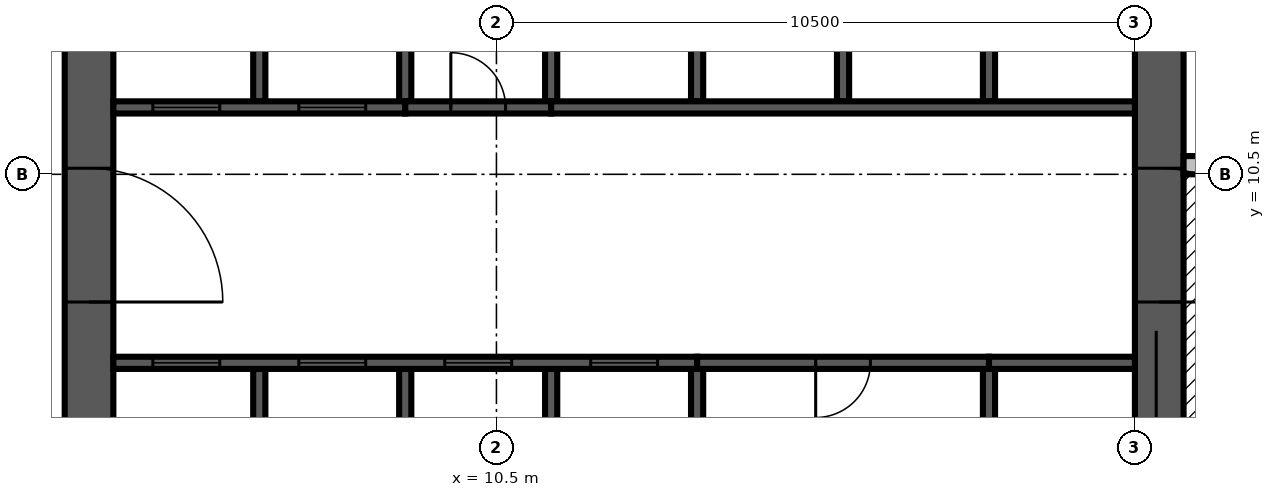
"""IFC4 building model, lengths in metres.
Left out: names, types, materials, properties, quantities, classifications, styles, units other than length and angle.
Written with IfcOpenShell. Run it as: python <this file> out.ifc"""

import sys

from ifc_helpers import new_model, si_unit, direction, frame, frame_2d, origin, place, context, subcontext, project, spatial, rectangle, extrude, source, transform, mapped, element, fill, save


model = new_model("IFC4")
c1 = context("Model", 3, precision=1e-05, world=origin(), true_north=direction((0.0, 1.0)))
c2 = subcontext(c1, "Body", "Model", "MODEL_VIEW")
j1 = project(units=[si_unit("LENGTHUNIT", "METRE"), si_unit("PLANEANGLEUNIT", "RADIAN")], contexts=[c1])
p1 = place(None, origin())
s1 = spatial("IfcSite", under=j1, at=p1, CompositionType="ELEMENT")
p2 = place(p1, origin())
s2 = spatial("IfcBuilding", under=s1, at=p2, CompositionType="ELEMENT")
p3 = place(p2, frame((0.0, 0.0, 253.8)))
s3 = spatial("IfcBuildingStorey", under=s2, at=p3, CompositionType="ELEMENT", Elevation=253.8)
m1 = source(origin(), c2, "Body", "SweptSolid", [
    extrude(rectangle(XDim=17.6, YDim=0.8, at=frame_2d((8.8, 0.0))), origin(), (0.0, 0.0, 1.0), 3.8),
])
p4 = place(p3, frame((3.8, 4.2, 0.0), z_axis=(0.0, 0.0, 1.0), x_axis=(0.0, 1.0, 0.0)))
e1 = element("IfcWall", 1, at=p4, inside=s3, PredefinedType="SHEAR", context=c2, shape_type="MappedRepresentation", body=[
    mapped(m1, transform((0.0, 0.0, 0.0), scale=1.0)),
])
m2 = source(origin(), c2, "Body", "SweptSolid", [
    extrude(rectangle(XDim=2.2, YDim=2.1, at=frame_2d((1.1, 1.05))), frame((0.0, 0.41, 0.0), z_axis=(0.0, -1.0, 0.0), x_axis=(1.0, 0.0, 0.0)), (0.0, 0.0, 1.0), 0.82),
])
p5 = place(p4, frame((4.2, 0.0, 0.0)))
e2 = element("IfcOpeningElement", 2, at=p5, cuts=e1, PredefinedType="OPENING", context=c2, shape_type="MappedRepresentation", body=[
    mapped(m2, transform((0.0, 0.0, 0.0), scale=1.0)),
])
m3 = source(origin(), c2, "Body", "SweptSolid", [
    extrude(rectangle(XDim=0.9, YDim=2.1, at=frame_2d((0.45, 1.05))), frame((0.0, 0.41, 0.0), z_axis=(0.0, -1.0, 0.0), x_axis=(1.0, 0.0, 0.0)), (0.0, 0.0, 1.0), 0.82),
])
p6 = place(p4, frame((10.95, 0.0, 0.0)))
e3 = element("IfcOpeningElement", 3, at=p6, cuts=e1, PredefinedType="OPENING", context=c2, shape_type="MappedRepresentation", body=[
    mapped(m3, transform((0.0, 0.0, 0.0), scale=1.0)),
])
m4 = source(origin(), c2, "Body", "SweptSolid", [
    extrude(rectangle(XDim=16.8, YDim=0.8, at=frame_2d((8.4, 0.0))), origin(), (0.0, 0.0, 1.0), 3.8),
])
p7 = place(p3, frame((21.4, 4.2, 0.0), z_axis=(0.0, 0.0, 1.0), x_axis=(0.0, 1.0, 0.0)))
e4 = element("IfcWall", 4, at=p7, inside=s3, PredefinedType="SHEAR", context=c2, shape_type="MappedRepresentation", body=[
    mapped(m4, transform((0.0, 0.0, 0.0), scale=1.0)),
])
p8 = place(p7, frame((4.2, 0.0, 0.0)))
e5 = element("IfcOpeningElement", 5, at=p8, cuts=e4, PredefinedType="OPENING", context=c2, shape_type="MappedRepresentation", body=[
    mapped(m2, transform((0.0, 0.0, 0.0), scale=1.0)),
])
m5 = source(origin(), c2, "Body", "SweptSolid", [
    extrude(rectangle(XDim=1.2, YDim=2.1, at=frame_2d((0.6, 1.05))), frame((0.0, 0.41, 0.0), z_axis=(0.0, -1.0, 0.0), x_axis=(1.0, 0.0, 0.0)), (0.0, 0.0, 1.0), 0.82),
])
p9 = place(p7, frame((14.7, 0.0, 0.0)))
e6 = element("IfcOpeningElement", 6, at=p9, cuts=e4, PredefinedType="OPENING", context=c2, shape_type="MappedRepresentation", body=[
    mapped(m5, transform((0.0, 0.0, 0.0), scale=1.0)),
])
m6 = source(origin(), c2, "Body", "SweptSolid", [
    extrude(rectangle(XDim=7.2, YDim=0.3, at=frame_2d((3.6, 0.0))), origin(), (0.0, 0.0, 1.0), 3.4),
])
p10 = place(p3, frame((21.8, 10.65, 0.0), z_axis=(0.0, 0.0, 1.0), x_axis=(1.0, 0.0, 0.0)))
e7 = element("IfcWall", 7, at=p10, inside=s3, PredefinedType="STANDARD", context=c2, shape_type="MappedRepresentation", body=[
    mapped(m6, transform((0.0, 0.0, 0.0), scale=1.0)),
])
m7 = source(origin(), c2, "Body", "SweptSolid", [
    extrude(rectangle(XDim=1.8, YDim=2.4, at=frame_2d((0.9, 1.2))), frame((0.0, 0.16, 0.0), z_axis=(0.0, -1.0, 0.0), x_axis=(1.0, 0.0, 0.0)), (0.0, 0.0, 1.0), 0.32),
])
p11 = place(p10, frame((0.4, 0.0, 0.0)))
e8 = element("IfcOpeningElement", 8, at=p11, cuts=e7, PredefinedType="OPENING", context=c2, shape_type="MappedRepresentation", body=[
    mapped(m7, transform((0.0, 0.0, 0.0), scale=1.0)),
])
p12 = place(p10, frame((4.6, 0.0, 0.0)))
e9 = element("IfcOpeningElement", 9, at=p12, cuts=e7, PredefinedType="OPENING", context=c2, shape_type="MappedRepresentation", body=[
    mapped(m7, transform((0.0, 0.0, 0.0), scale=1.0)),
])
m8 = source(origin(), c2, "Body", "SweptSolid", [
    extrude(rectangle(XDim=3.1, YDim=0.2, at=frame_2d((1.55, 0.0))), origin(), (0.0, 0.0, 1.0), 3.8),
])
for number, where, z_axis, x_axis in (
    (10, (6.6, 4.2, 0.0), (0.0, 0.0, 1.0), (0.0, 1.0, 0.0)),
    (11, (9.0, 4.2, 0.0), (0.0, 0.0, 1.0), (0.0, 1.0, 0.0)),
    (12, (11.4, 4.2, 0.0), (0.0, 0.0, 1.0), (0.0, 1.0, 0.0)),
):
    element("IfcWall", number, at=place(p3, frame(where, z_axis=z_axis, x_axis=x_axis)), inside=s3, PredefinedType="SOLIDWALL", context=c2, shape_type="MappedRepresentation", body=[
        mapped(m8, transform((0.0, 0.0, 0.0), scale=1.0)),
    ])
m9 = source(origin(), c2, "Body", "SweptSolid", [
    extrude(rectangle(XDim=3.1, YDim=0.2, at=frame_2d((1.55, 0.0))), origin(), (0.0, 0.0, 1.0), 3.4),
])
for number, where, z_axis, x_axis in (
    (13, (13.8, 4.2, 0.0), (0.0, 0.0, 1.0), (0.0, 1.0, 0.0)),
    (14, (18.6, 4.2, 0.0), (0.0, 0.0, 1.0), (0.0, 1.0, 0.0)),
):
    element("IfcWall", number, at=place(p3, frame(where, z_axis=z_axis, x_axis=x_axis)), inside=s3, PredefinedType="SOLIDWALL", context=c2, shape_type="MappedRepresentation", body=[
        mapped(m9, transform((0.0, 0.0, 0.0), scale=1.0)),
    ])
m10 = source(origin(), c2, "Body", "SweptSolid", [
    extrude(rectangle(XDim=3.0, YDim=0.2, at=frame_2d((1.5, 0.0))), origin(), (0.0, 0.0, 1.0), 3.8),
])
p13 = place(p3, frame((6.6, 11.7, 0.0), z_axis=(0.0, 0.0, 1.0), x_axis=(0.0, 1.0, 0.0)))
e15 = element("IfcWall", 15, at=p13, inside=s3, PredefinedType="SOLIDWALL", context=c2, shape_type="MappedRepresentation", body=[
    mapped(m10, transform((0.0, 0.0, 0.0), scale=1.0)),
])
m11 = source(origin(), c2, "Body", "SweptSolid", [
    extrude(rectangle(XDim=3.0, YDim=0.2, at=frame_2d((1.5, 0.0))), origin(), (0.0, 0.0, 1.0), 3.4),
])
for number, where, z_axis, x_axis in (
    (16, (9.0, 11.7, 0.0), (0.0, 0.0, 1.0), (0.0, 1.0, 0.0)),
    (17, (11.4, 11.7, 0.0), (0.0, 0.0, 1.0), (0.0, 1.0, 0.0)),
):
    element("IfcWall", number, at=place(p3, frame(where, z_axis=z_axis, x_axis=x_axis)), inside=s3, PredefinedType="SOLIDWALL", context=c2, shape_type="MappedRepresentation", body=[
        mapped(m11, transform((0.0, 0.0, 0.0), scale=1.0)),
    ])
for number, where, z_axis, x_axis in (
    (18, (13.8, 11.7, 0.0), (0.0, 0.0, 1.0), (0.0, 1.0, 0.0)),
    (19, (16.2, 11.7, 0.0), (0.0, 0.0, 1.0), (0.0, 1.0, 0.0)),
    (20, (18.6, 11.7, 0.0), (0.0, 0.0, 1.0), (0.0, 1.0, 0.0)),
):
    element("IfcWall", number, at=place(p3, frame(where, z_axis=z_axis, x_axis=x_axis)), inside=s3, PredefinedType="SOLIDWALL", context=c2, shape_type="MappedRepresentation", body=[
        mapped(m10, transform((0.0, 0.0, 0.0), scale=1.0)),
    ])
m12 = source(origin(), c2, "Body", "SweptSolid", [
    extrude(rectangle(XDim=9.6, YDim=0.2, at=frame_2d((4.8, 0.0))), origin(), (0.0, 0.0, 1.0), 3.8),
])
p14 = place(p3, frame((4.2, 7.4, 0.0), z_axis=(0.0, 0.0, 1.0), x_axis=(1.0, 0.0, 0.0)))
e21 = element("IfcWall", 21, at=p14, inside=s3, PredefinedType="SOLIDWALL", context=c2, shape_type="MappedRepresentation", body=[
    mapped(m12, transform((0.0, 0.0, 0.0), scale=1.0)),
])
m13 = source(origin(), c2, "Body", "SweptSolid", [
    extrude(rectangle(XDim=1.1, YDim=2.1, at=frame_2d((0.55, 1.05))), frame((0.0, 0.11, 0.0), z_axis=(0.0, -1.0, 0.0), x_axis=(1.0, 0.0, 0.0)), (0.0, 0.0, 1.0), 0.22),
])
p15 = place(p14, frame((0.65, 0.0, 0.0)))
e22 = element("IfcOpeningElement", 22, at=p15, cuts=e21, PredefinedType="OPENING", context=c2, shape_type="MappedRepresentation", body=[
    mapped(m13, transform((0.0, 0.0, 0.0), scale=1.0)),
])
p16 = place(p14, frame((3.05, 0.0, 0.0)))
e23 = element("IfcOpeningElement", 23, at=p16, cuts=e21, PredefinedType="OPENING", context=c2, shape_type="MappedRepresentation", body=[
    mapped(m13, transform((0.0, 0.0, 0.0), scale=1.0)),
])
p17 = place(p14, frame((5.45, 0.0, 0.0)))
e24 = element("IfcOpeningElement", 24, at=p17, cuts=e21, PredefinedType="OPENING", context=c2, shape_type="MappedRepresentation", body=[
    mapped(m13, transform((0.0, 0.0, 0.0), scale=1.0)),
])
p18 = place(p14, frame((7.85, 0.0, 0.0)))
e25 = element("IfcOpeningElement", 25, at=p18, cuts=e21, PredefinedType="OPENING", context=c2, shape_type="MappedRepresentation", body=[
    mapped(m13, transform((0.0, 0.0, 0.0), scale=1.0)),
])
m14 = source(origin(), c2, "Body", "SweptSolid", [
    extrude(rectangle(XDim=4.8, YDim=0.2, at=frame_2d((2.4, 0.0))), origin(), (0.0, 0.0, 1.0), 3.4),
])
p19 = place(p3, frame((13.8, 7.4, 0.0), z_axis=(0.0, 0.0, 1.0), x_axis=(1.0, 0.0, 0.0)))
e26 = element("IfcWall", 26, at=p19, inside=s3, PredefinedType="SOLIDWALL", context=c2, shape_type="MappedRepresentation", body=[
    mapped(m14, transform((0.0, 0.0, 0.0), scale=1.0)),
])
m15 = source(origin(), c2, "Body", "SweptSolid", [
    extrude(rectangle(XDim=0.9, YDim=2.1, at=frame_2d((0.45, 1.05))), frame((0.0, 0.11, 0.0), z_axis=(0.0, -1.0, 0.0), x_axis=(1.0, 0.0, 0.0)), (0.0, 0.0, 1.0), 0.22),
])
p20 = place(p19, frame((1.95, 0.0, 0.0)))
e27 = element("IfcOpeningElement", 27, at=p20, cuts=e26, PredefinedType="OPENING", context=c2, shape_type="MappedRepresentation", body=[
    mapped(m15, transform((0.0, 0.0, 0.0), scale=1.0)),
])
m16 = source(origin(), c2, "Body", "SweptSolid", [
    extrude(rectangle(XDim=2.4, YDim=0.2, at=frame_2d((1.2, 0.0))), origin(), (0.0, 0.0, 1.0), 3.8),
])
p21 = place(p3, frame((18.6, 7.4, 0.0), z_axis=(0.0, 0.0, 1.0), x_axis=(1.0, 0.0, 0.0)))
e28 = element("IfcWall", 28, at=p21, inside=s3, PredefinedType="SOLIDWALL", context=c2, shape_type="MappedRepresentation", body=[
    mapped(m16, transform((0.0, 0.0, 0.0), scale=1.0)),
])
m17 = source(origin(), c2, "Body", "SweptSolid", [
    extrude(rectangle(XDim=4.8, YDim=0.2, at=frame_2d((2.4, 0.0))), origin(), (0.0, 0.0, 1.0), 3.8),
])
p22 = place(p3, frame((4.2, 11.6, 0.0), z_axis=(0.0, 0.0, 1.0), x_axis=(1.0, 0.0, 0.0)))
e29 = element("IfcWall", 29, at=p22, inside=s3, PredefinedType="SOLIDWALL", context=c2, shape_type="MappedRepresentation", body=[
    mapped(m17, transform((0.0, 0.0, 0.0), scale=1.0)),
])
p23 = place(p22, frame((0.65, 0.0, 0.0)))
e30 = element("IfcOpeningElement", 30, at=p23, cuts=e29, PredefinedType="OPENING", context=c2, shape_type="MappedRepresentation", body=[
    mapped(m13, transform((0.0, 0.0, 0.0), scale=1.0)),
])
p24 = place(p22, frame((3.05, 0.0, 0.0)))
e31 = element("IfcOpeningElement", 31, at=p24, cuts=e29, PredefinedType="OPENING", context=c2, shape_type="MappedRepresentation", body=[
    mapped(m13, transform((0.0, 0.0, 0.0), scale=1.0)),
])
m18 = source(origin(), c2, "Body", "SweptSolid", [
    extrude(rectangle(XDim=2.4, YDim=0.2, at=frame_2d((1.2, 0.0))), origin(), (0.0, 0.0, 1.0), 3.4),
])
p25 = place(p3, frame((9.0, 11.6, 0.0), z_axis=(0.0, 0.0, 1.0), x_axis=(1.0, 0.0, 0.0)))
e32 = element("IfcWall", 32, at=p25, inside=s3, PredefinedType="SOLIDWALL", context=c2, shape_type="MappedRepresentation", body=[
    mapped(m18, transform((0.0, 0.0, 0.0), scale=1.0)),
])
p26 = place(p25, frame((0.75, 0.0, 0.0)))
e33 = element("IfcOpeningElement", 33, at=p26, cuts=e32, PredefinedType="OPENING", context=c2, shape_type="MappedRepresentation", body=[
    mapped(m15, transform((0.0, 0.0, 0.0), scale=1.0)),
])
p27 = place(p3, frame((11.4, 11.6, 0.0), z_axis=(0.0, 0.0, 1.0), x_axis=(1.0, 0.0, 0.0)))
e34 = element("IfcWall", 34, at=p27, inside=s3, PredefinedType="SOLIDWALL", context=c2, shape_type="MappedRepresentation", body=[
    mapped(m12, transform((0.0, 0.0, 0.0), scale=1.0)),
])
m19 = source(origin(), c2, "Body", "SweptSolid", [
    extrude(rectangle(XDim=1.1, YDim=2.1, at=frame_2d((0.55, 1.05))), frame((0.0, 0.025, 0.0), z_axis=(0.0, -1.0, 0.0), x_axis=(1.0, 0.0, 0.0)), (0.0, 0.0, 1.0), 0.05),
])
p28 = place(p15, origin())
e35 = element("IfcDoor", 35, at=p28, inside=s3, OperationType="SLIDING_TO_LEFT", PredefinedType="DOOR", context=c2, shape_type="MappedRepresentation", body=[
    mapped(m19, transform((0.0, 0.0, 0.0), scale=1.0)),
])
fill(e22, e35)
p29 = place(p16, origin())
e36 = element("IfcDoor", 36, at=p29, inside=s3, OperationType="SLIDING_TO_LEFT", PredefinedType="DOOR", context=c2, shape_type="MappedRepresentation", body=[
    mapped(m19, transform((0.0, 0.0, 0.0), scale=1.0)),
])
fill(e23, e36)
p30 = place(p17, origin())
e37 = element("IfcDoor", 37, at=p30, inside=s3, OperationType="SLIDING_TO_LEFT", PredefinedType="DOOR", context=c2, shape_type="MappedRepresentation", body=[
    mapped(m19, transform((0.0, 0.0, 0.0), scale=1.0)),
])
fill(e24, e37)
p31 = place(p18, origin())
e38 = element("IfcDoor", 38, at=p31, inside=s3, OperationType="SLIDING_TO_LEFT", PredefinedType="DOOR", context=c2, shape_type="MappedRepresentation", body=[
    mapped(m19, transform((0.0, 0.0, 0.0), scale=1.0)),
])
fill(e25, e38)
m20 = source(origin(), c2, "Body", "SweptSolid", [
    extrude(rectangle(XDim=0.9, YDim=2.1, at=frame_2d((0.45, 1.05))), frame((0.0, 0.025, 0.0), z_axis=(0.0, -1.0, 0.0), x_axis=(1.0, 0.0, 0.0)), (0.0, 0.0, 1.0), 0.05),
])
p32 = place(p20, origin())
e39 = element("IfcDoor", 39, at=p32, inside=s3, OperationType="SINGLE_SWING_RIGHT", PredefinedType="DOOR", context=c2, shape_type="MappedRepresentation", body=[
    mapped(m20, transform((0.0, 0.0, 0.0), scale=1.0)),
])
fill(e27, e39)
p33 = place(p23, origin())
e40 = element("IfcDoor", 40, at=p33, inside=s3, OperationType="SLIDING_TO_LEFT", PredefinedType="DOOR", context=c2, shape_type="MappedRepresentation", body=[
    mapped(m19, transform((0.0, 0.0, 0.0), scale=1.0)),
])
fill(e30, e40)
p34 = place(p24, origin())
e41 = element("IfcDoor", 41, at=p34, inside=s3, OperationType="SLIDING_TO_LEFT", PredefinedType="DOOR", context=c2, shape_type="MappedRepresentation", body=[
    mapped(m19, transform((0.0, 0.0, 0.0), scale=1.0)),
])
fill(e31, e41)
p35 = place(p26, origin())
e42 = element("IfcDoor", 42, at=p35, inside=s3, OperationType="SINGLE_SWING_LEFT", PredefinedType="DOOR", context=c2, shape_type="MappedRepresentation", body=[
    mapped(m20, transform((0.0, 0.0, 0.0), scale=1.0)),
])
fill(e33, e42)
m21 = source(origin(), c2, "Body", "SweptSolid", [
    extrude(rectangle(XDim=2.2, YDim=2.1, at=frame_2d((1.1, 1.05))), frame((0.0, 0.025, 0.0), z_axis=(0.0, -1.0, 0.0), x_axis=(1.0, 0.0, 0.0)), (0.0, 0.0, 1.0), 0.05),
])
p36 = place(p8, origin())
e43 = element("IfcDoor", 43, at=p36, inside=s3, OperationType="DOUBLE_DOOR_SINGLE_SWING", PredefinedType="DOOR", context=c2, shape_type="MappedRepresentation", body=[
    mapped(m21, transform((0.0, 0.0, 0.0), scale=1.0)),
])
fill(e5, e43)
p37 = place(p5, origin())
e44 = element("IfcDoor", 44, at=p37, inside=s3, OperationType="DOUBLE_DOOR_SINGLE_SWING", PredefinedType="DOOR", context=c2, shape_type="MappedRepresentation", body=[
    mapped(m21, transform((0.0, 0.0, 0.0), scale=1.0)),
])
fill(e2, e44)
save(model, sys.argv[1])
